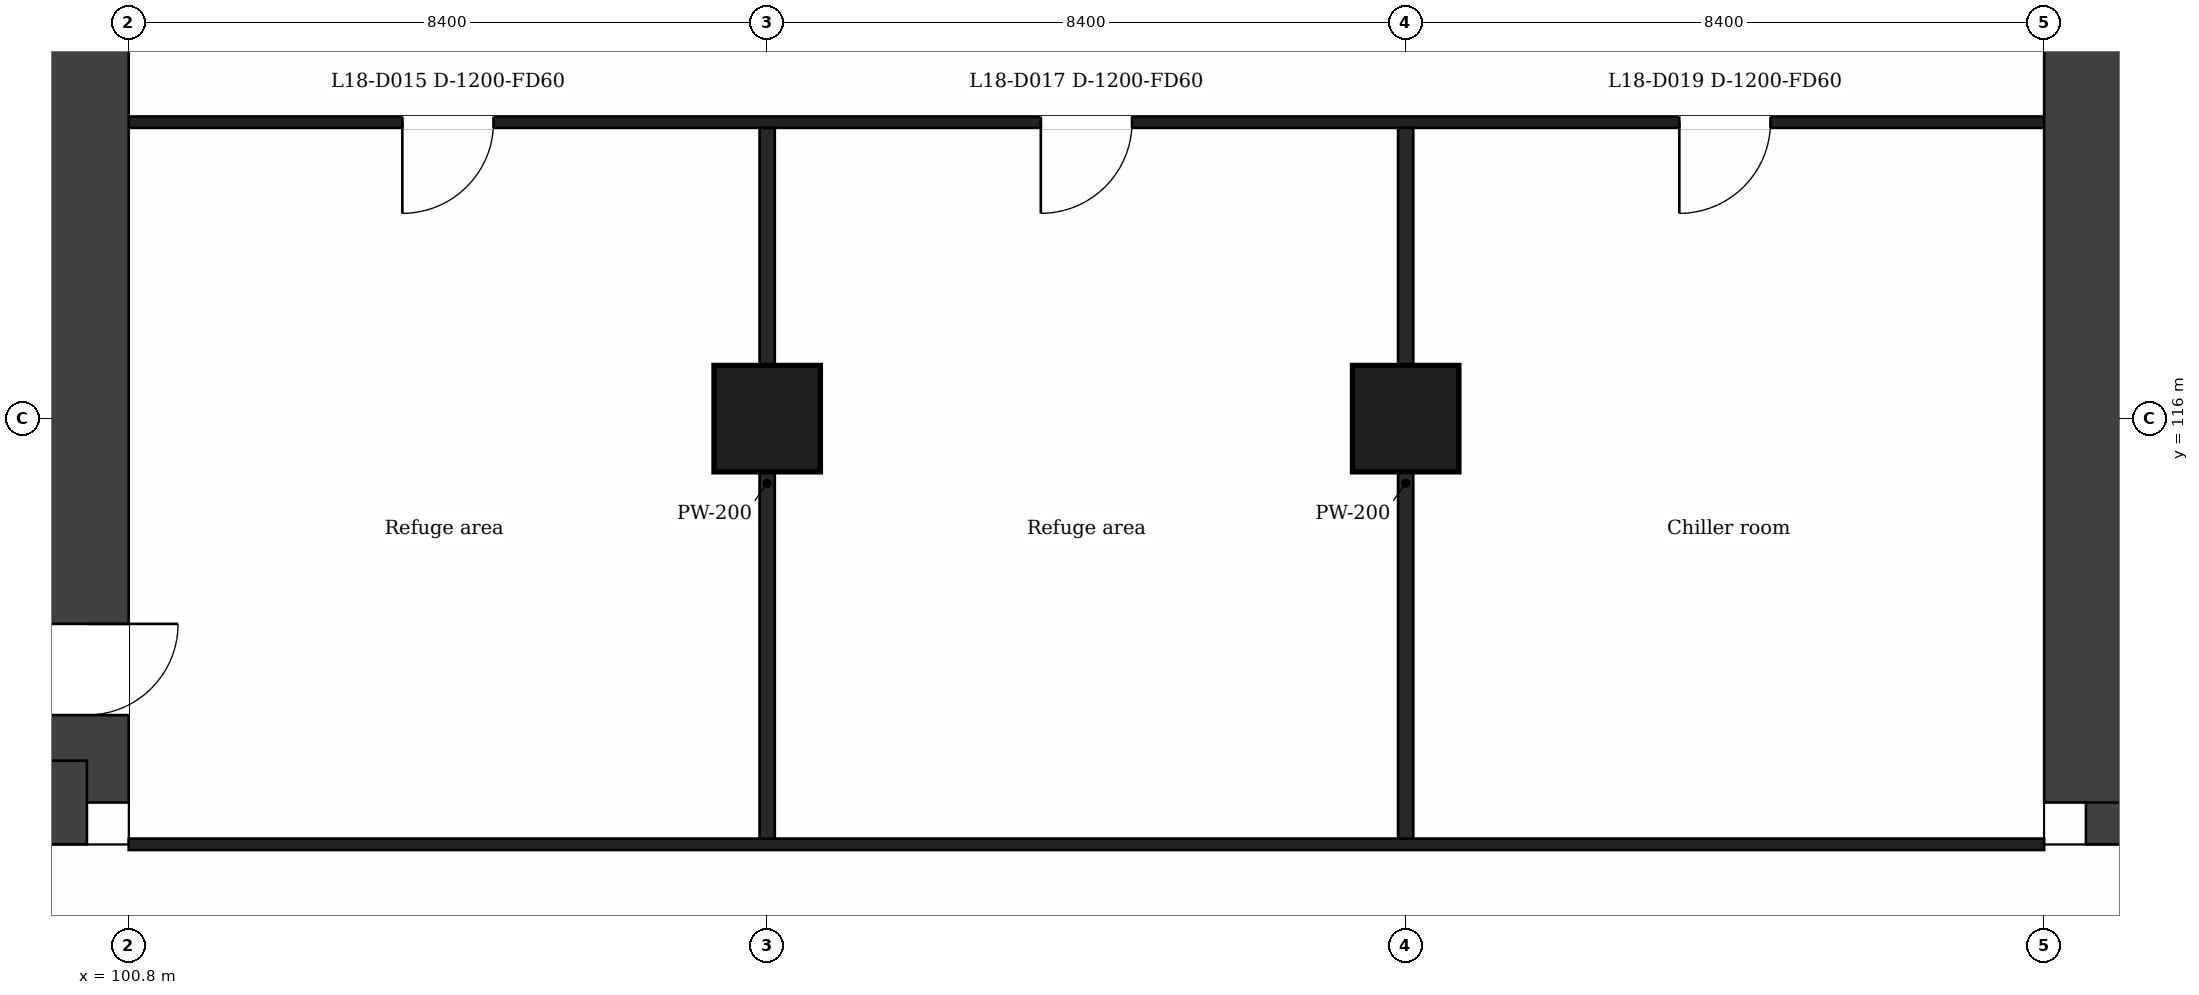
"""IFC4 building model, lengths in metres.
Left out: names, types, materials, properties, quantities, classifications, styles, units other than length and angle.
Written with IfcOpenShell. Run it as: python <this file> out.ifc"""

import sys

from ifc_helpers import new_model, si_unit, direction, frame, frame_2d, origin, origin_2d, place, context, subcontext, project, spatial, rectangle, extrude, element, fill, save


model = new_model("IFC4")
c1 = context("Model", 3, precision=1e-05, world=origin(), true_north=direction((0.0, 1.0)))
c2 = subcontext(c1, "Body", "Model", "MODEL_VIEW")
j1 = project(units=[si_unit("LENGTHUNIT", "METRE"), si_unit("PLANEANGLEUNIT", "RADIAN")], contexts=[c1])
p1 = place(None, origin())
s1 = spatial("IfcSite", under=j1, at=p1, CompositionType="ELEMENT")
p2 = place(p1, origin())
s2 = spatial("IfcBuilding", under=s1, at=p2, CompositionType="ELEMENT")
p3 = place(p2, frame((0.0, 0.0, 81.0)))
s3 = spatial("IfcBuildingStorey", under=s2, at=p3, CompositionType="ELEMENT", Elevation=81.0)
p4 = place(p3, frame((100.25, 131.85, 0.0), z_axis=(0.0, 0.0, 1.0), x_axis=(0.0, -1.0, 0.0)))
e1 = element("IfcWall", 1, at=p4, inside=s3, PredefinedType="SHEAR", context=c2, shape_type="SweptSolid", body=[
    extrude(rectangle(XDim=20.9, YDim=1.1, at=frame_2d((10.45, 0.0))), origin(), (0.0, 0.0, 1.0), 5.0),
])
p5 = place(p4, frame((18.55, 0.0, 0.0)))
e2 = element("IfcOpeningElement", 2, at=p5, cuts=e1, PredefinedType="OPENING", context=c2, shape_type="SweptSolid", body=[
    extrude(rectangle(XDim=1.2, YDim=2.1, at=frame_2d((0.6, 1.05))), frame((0.0, 0.56, 0.0), z_axis=(0.0, -1.0, 0.0), x_axis=(1.0, 0.0, 0.0)), (0.0, 0.0, 1.0), 1.12),
])
p6 = place(p4, frame((7.7, 0.0, 0.0)))
e3 = element("IfcOpeningElement", 3, at=p6, cuts=e1, PredefinedType="OPENING", context=c2, shape_type="SweptSolid", body=[
    extrude(rectangle(XDim=1.4, YDim=2.1, at=frame_2d((0.7, 1.05))), frame((0.0, 0.56, 0.0), z_axis=(0.0, -1.0, 0.0), x_axis=(1.0, 0.0, 0.0)), (0.0, 0.0, 1.0), 1.12),
])
p7 = place(p3, frame((100.25, 110.95, 0.0), z_axis=(0.0, 0.0, 1.0), x_axis=(-1.0, 0.0, 0.0)))
e4 = element("IfcWall", 4, at=p7, inside=s3, PredefinedType="SHEAR", context=c2, shape_type="SweptSolid", body=[
    extrude(rectangle(XDim=13.952, YDim=1.1, at=frame_2d((6.976, 0.0))), origin(), (0.0, 0.0, 1.0), 5.0),
])
p8 = place(p7, frame((5.748, 0.0, 0.0)))
e5 = element("IfcOpeningElement", 5, at=p8, cuts=e4, PredefinedType="OPENING", context=c2, shape_type="SweptSolid", body=[
    extrude(rectangle(XDim=1.4, YDim=2.1, at=frame_2d((0.7, 1.05))), frame((0.0, 0.56, 0.0), z_axis=(0.0, -1.0, 0.0), x_axis=(1.0, 0.0, 0.0)), (0.0, 0.0, 1.0), 1.12),
])
p9 = place(p3, frame((140.502, 110.95, 0.0), z_axis=(0.0, 0.0, 1.0), x_axis=(-1.0, 0.0, 0.0)))
e6 = element("IfcWall", 6, at=p9, inside=s3, PredefinedType="SHEAR", context=c2, shape_type="SweptSolid", body=[
    extrude(rectangle(XDim=13.952, YDim=1.1, at=frame_2d((6.976, 0.0))), origin(), (0.0, 0.0, 1.0), 5.0),
])
p10 = place(p9, frame((6.804, 0.0, 0.0)))
e7 = element("IfcOpeningElement", 7, at=p10, cuts=e6, PredefinedType="OPENING", context=c2, shape_type="SweptSolid", body=[
    extrude(rectangle(XDim=1.4, YDim=2.1, at=frame_2d((0.7, 1.05))), frame((0.0, 0.56, 0.0), z_axis=(0.0, -1.0, 0.0), x_axis=(1.0, 0.0, 0.0)), (0.0, 0.0, 1.0), 1.12),
])
p11 = place(p3, frame((126.55, 110.95, 0.0), z_axis=(0.0, 0.0, 1.0), x_axis=(0.0, 1.0, 0.0)))
e8 = element("IfcWall", 8, at=p11, inside=s3, PredefinedType="SHEAR", context=c2, shape_type="SweptSolid", body=[
    extrude(rectangle(XDim=20.9, YDim=1.1, at=frame_2d((10.45, 0.0))), origin(), (0.0, 0.0, 1.0), 5.0),
])
p12 = place(p11, frame((17.45, 0.0, 0.0)))
e9 = element("IfcOpeningElement", 9, at=p12, cuts=e8, PredefinedType="OPENING", context=c2, shape_type="SweptSolid", body=[
    extrude(rectangle(XDim=1.2, YDim=2.1, at=frame_2d((0.6, 1.05))), frame((0.0, 0.56, 0.0), z_axis=(0.0, -1.0, 0.0), x_axis=(1.0, 0.0, 0.0)), (0.0, 0.0, 1.0), 1.12),
])
p13 = place(p11, frame((11.8, 0.0, 0.0)))
e10 = element("IfcOpeningElement", 10, at=p13, cuts=e8, PredefinedType="OPENING", context=c2, shape_type="SweptSolid", body=[
    extrude(rectangle(XDim=1.4, YDim=2.1, at=frame_2d((0.7, 1.05))), frame((0.0, 0.56, 0.0), z_axis=(0.0, -1.0, 0.0), x_axis=(1.0, 0.0, 0.0)), (0.0, 0.0, 1.0), 1.12),
])
for number, where, z_axis, x_axis in (
    (11, (109.2, 116.0, 0.0), (0.0, 0.0, 1.0), (1.0, 0.0, 0.0)),
    (12, (117.6, 116.0, 0.0), (0.0, 0.0, 1.0), (1.0, 0.0, 0.0)),
):
    element("IfcColumn", number, at=place(p3, frame(where, z_axis=z_axis, x_axis=x_axis)), inside=s3, PredefinedType="COLUMN", context=c2, shape_type="SweptSolid", body=[
        extrude(rectangle(XDim=1.4, YDim=1.4, at=origin_2d()), origin(), (0.0, 0.0, 1.0), 5.0),
    ])
p14 = place(p3, frame((100.8, 110.4, 0.0), z_axis=(0.0, 0.0, 1.0), x_axis=(1.0, 0.0, 0.0)))
e13 = element("IfcWall", 13, at=p14, inside=s3, PredefinedType="PARTITIONING", context=c2, shape_type="SweptSolid", body=[
    extrude(rectangle(XDim=25.2, YDim=0.15, at=frame_2d((12.6, 0.0))), origin(), (0.0, 0.0, 1.0), 4.55),
])
p15 = place(p3, frame((100.8, 119.9, 0.0), z_axis=(0.0, 0.0, 1.0), x_axis=(1.0, 0.0, 0.0)))
e14 = element("IfcWall", 14, at=p15, inside=s3, PredefinedType="PARTITIONING", context=c2, shape_type="SweptSolid", body=[
    extrude(rectangle(XDim=25.2, YDim=0.15, at=frame_2d((12.6, 0.0))), origin(), (0.0, 0.0, 1.0), 4.55),
])
p16 = place(p15, frame((3.6, 0.0, 0.0)))
e15 = element("IfcOpeningElement", 15, at=p16, cuts=e14, PredefinedType="OPENING", context=c2, shape_type="SweptSolid", body=[
    extrude(rectangle(XDim=1.2, YDim=2.1, at=frame_2d((0.6, 1.05))), frame((0.0, 0.085, 0.0), z_axis=(0.0, -1.0, 0.0), x_axis=(1.0, 0.0, 0.0)), (0.0, 0.0, 1.0), 0.17),
])
p17 = place(p15, frame((12.0, 0.0, 0.0)))
e16 = element("IfcOpeningElement", 16, at=p17, cuts=e14, PredefinedType="OPENING", context=c2, shape_type="SweptSolid", body=[
    extrude(rectangle(XDim=1.2, YDim=2.1, at=frame_2d((0.6, 1.05))), frame((0.0, 0.085, 0.0), z_axis=(0.0, -1.0, 0.0), x_axis=(1.0, 0.0, 0.0)), (0.0, 0.0, 1.0), 0.17),
])
p18 = place(p15, frame((20.4, 0.0, 0.0)))
e17 = element("IfcOpeningElement", 17, at=p18, cuts=e14, PredefinedType="OPENING", context=c2, shape_type="SweptSolid", body=[
    extrude(rectangle(XDim=1.2, YDim=2.1, at=frame_2d((0.6, 1.05))), frame((0.0, 0.085, 0.0), z_axis=(0.0, -1.0, 0.0), x_axis=(1.0, 0.0, 0.0)), (0.0, 0.0, 1.0), 0.17),
])
for number, where, z_axis, x_axis in (
    (18, (109.2, 110.475, 0.0), (0.0, 0.0, 1.0), (0.0, 1.0, 0.0)),
    (19, (117.6, 110.475, 0.0), (0.0, 0.0, 1.0), (0.0, 1.0, 0.0)),
):
    element("IfcWall", number, at=place(p3, frame(where, z_axis=z_axis, x_axis=x_axis)), inside=s3, PredefinedType="PARTITIONING", context=c2, shape_type="SweptSolid", body=[
        extrude(rectangle(XDim=9.35, YDim=0.2, at=frame_2d((4.675, 0.0))), origin(), (0.0, 0.0, 1.0), 4.55),
    ])
p19 = place(p16, origin())
e20 = element("IfcDoor", 20, at=p19, inside=s3, OperationType="SINGLE_SWING_LEFT", PredefinedType="DOOR", context=c2, shape_type="SweptSolid", body=[
    extrude(rectangle(XDim=1.2, YDim=2.1, at=frame_2d((0.6, 1.05))), frame((0.0, 0.025, 0.0), z_axis=(0.0, -1.0, 0.0), x_axis=(1.0, 0.0, 0.0)), (0.0, 0.0, 1.0), 0.05),
])
fill(e15, e20)
p20 = place(p17, origin())
e21 = element("IfcDoor", 21, at=p20, inside=s3, OperationType="SINGLE_SWING_LEFT", PredefinedType="DOOR", context=c2, shape_type="SweptSolid", body=[
    extrude(rectangle(XDim=1.2, YDim=2.1, at=frame_2d((0.6, 1.05))), frame((0.0, 0.025, 0.0), z_axis=(0.0, -1.0, 0.0), x_axis=(1.0, 0.0, 0.0)), (0.0, 0.0, 1.0), 0.05),
])
fill(e16, e21)
p21 = place(p18, origin())
e22 = element("IfcDoor", 22, at=p21, inside=s3, OperationType="SINGLE_SWING_LEFT", PredefinedType="DOOR", context=c2, shape_type="SweptSolid", body=[
    extrude(rectangle(XDim=1.2, YDim=2.1, at=frame_2d((0.6, 1.05))), frame((0.0, 0.025, 0.0), z_axis=(0.0, -1.0, 0.0), x_axis=(1.0, 0.0, 0.0)), (0.0, 0.0, 1.0), 0.05),
])
fill(e17, e22)
p22 = place(p5, origin())
e23 = element("IfcDoor", 23, at=p22, inside=s3, OperationType="SINGLE_SWING_LEFT", PredefinedType="DOOR", context=c2, shape_type="SweptSolid", body=[
    extrude(rectangle(XDim=1.2, YDim=2.1, at=frame_2d((0.6, 1.05))), frame((0.0, 0.025, 0.0), z_axis=(0.0, -1.0, 0.0), x_axis=(1.0, 0.0, 0.0)), (0.0, 0.0, 1.0), 0.05),
])
fill(e2, e23)
save(model, sys.argv[1])
